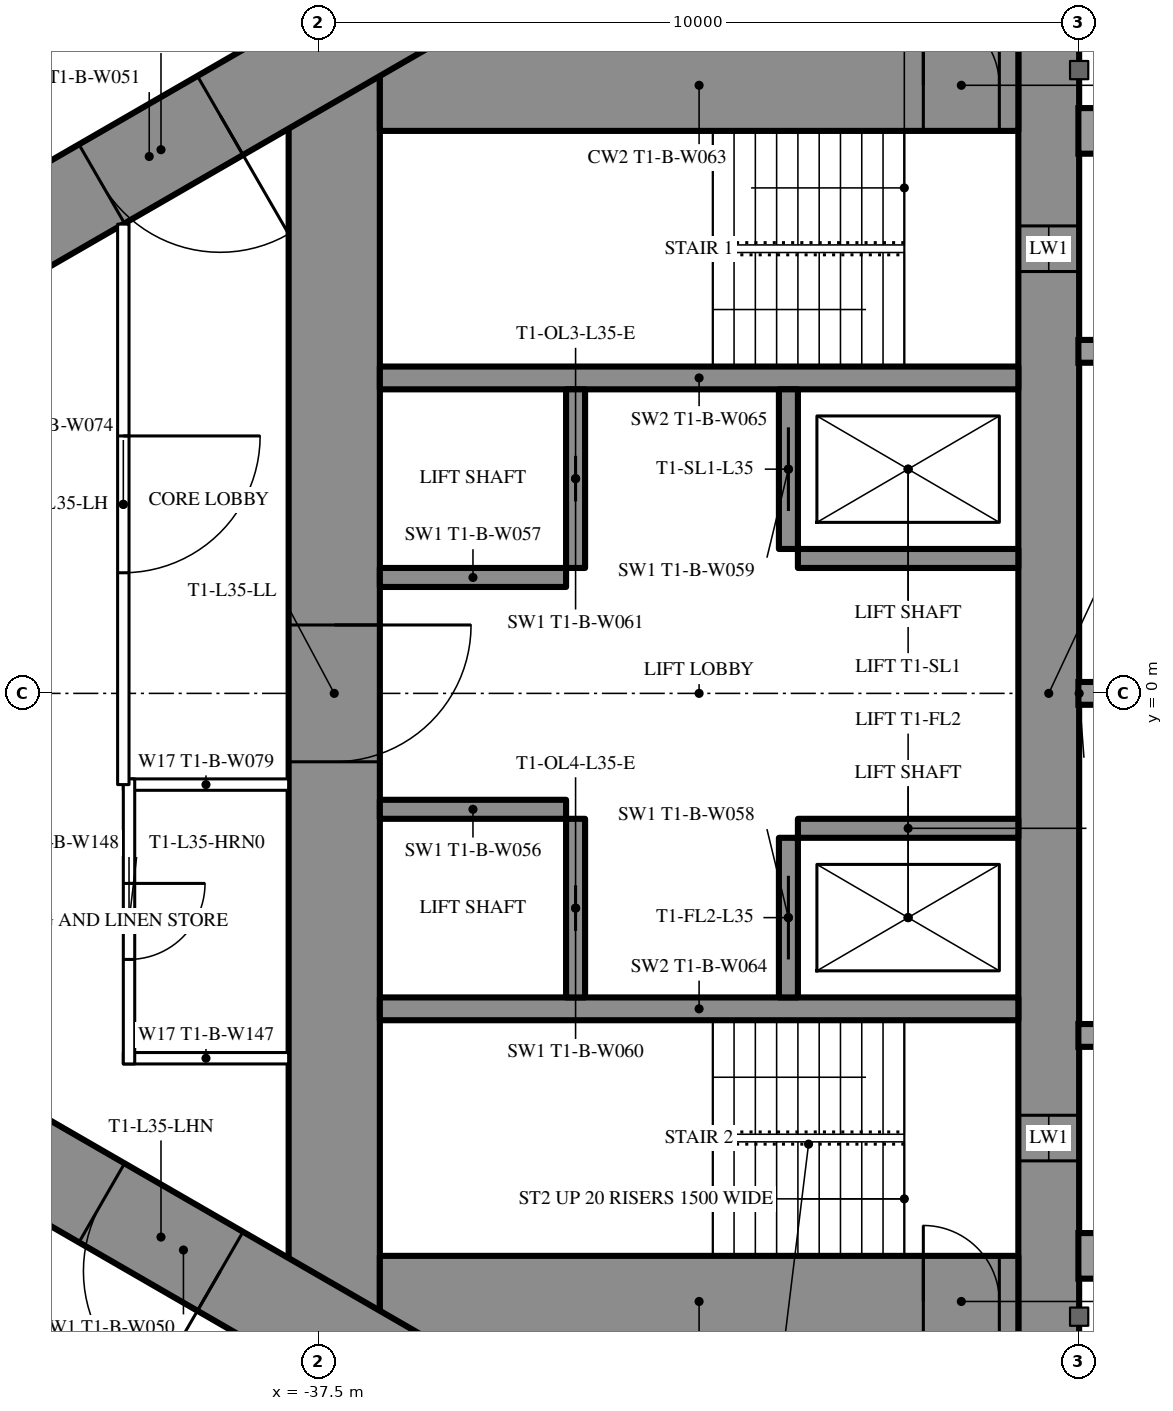
"""IFC4 building model, lengths in metres.
Left out: names, types, materials, properties, quantities, classifications, styles, units other than length and angle.
Written with IfcOpenShell. Run it as: python <this file> out.ifc"""

import sys

from ifc_helpers import new_model, si_unit, direction, frame, frame_2d, origin, place, context, subcontext, project, spatial, rectangle, extrude, element, fill, save


model = new_model("IFC4")
c1 = context("Model", 3, precision=1e-05, world=origin(), true_north=direction((0.0, 1.0)))
c2 = subcontext(c1, "Body", "Model", "MODEL_VIEW")
j1 = project(units=[si_unit("LENGTHUNIT", "METRE"), si_unit("PLANEANGLEUNIT", "RADIAN")], contexts=[c1])
p1 = place(None, origin())
s1 = spatial("IfcSite", under=j1, at=p1, CompositionType="ELEMENT")
p2 = place(p1, origin())
s2 = spatial("IfcBuilding", under=s1, at=p2, CompositionType="ELEMENT")
p3 = place(p2, frame((0.0, 0.0, 132.6)))
s3 = spatial("IfcBuildingStorey", under=s2, at=p3, CompositionType="ELEMENT", Elevation=132.6)
p4 = place(p3, frame((-27.9, 8.6, 0.0), z_axis=(0.0, 0.0, 1.0), x_axis=(0.0, -1.0, 0.0)))
e1 = element("IfcWall", 1, at=p4, inside=s3, PredefinedType="SHEAR", context=c2, shape_type="SweptSolid", body=[
    extrude(rectangle(XDim=17.2, YDim=0.8, at=frame_2d((8.6, 0.0))), origin(), (0.0, 0.0, 1.0), 3.5),
])
p5 = place(p4, frame((2.45, 0.0, 0.6)))
e2 = element("IfcOpeningElement", 2, at=p5, cuts=e1, PredefinedType="OPENING", context=c2, shape_type="SweptSolid", body=[
    extrude(rectangle(XDim=0.6, YDim=2.1, at=frame_2d((0.3, 1.05))), frame((0.0, 0.41, 0.0), z_axis=(0.0, -1.0, 0.0), x_axis=(1.0, 0.0, 0.0)), (0.0, 0.0, 1.0), 0.82),
])
p6 = place(p4, frame((14.15, 0.0, 0.6)))
e3 = element("IfcOpeningElement", 3, at=p6, cuts=e1, PredefinedType="OPENING", context=c2, shape_type="SweptSolid", body=[
    extrude(rectangle(XDim=0.6, YDim=2.1, at=frame_2d((0.3, 1.05))), frame((0.0, 0.41, 0.0), z_axis=(0.0, -1.0, 0.0), x_axis=(1.0, 0.0, 0.0)), (0.0, 0.0, 1.0), 0.82),
])
p7 = place(p3, frame((-37.3, 8.6, 0.0), z_axis=(0.0, 0.0, 1.0), x_axis=(0.0, -1.0, 0.0)))
e4 = element("IfcWall", 4, at=p7, inside=s3, PredefinedType="SHEAR", context=c2, shape_type="SweptSolid", body=[
    extrude(rectangle(XDim=17.2, YDim=1.2, at=frame_2d((8.6, 0.0))), origin(), (0.0, 0.0, 1.0), 3.5),
])
p8 = place(p7, frame((7.7, 0.0, 0.0)))
e5 = element("IfcOpeningElement", 5, at=p8, cuts=e4, PredefinedType="OPENING", context=c2, shape_type="SweptSolid", body=[
    extrude(rectangle(XDim=1.8, YDim=2.2, at=frame_2d((0.9, 1.1))), frame((0.0, 0.61, 0.0), z_axis=(0.0, -1.0, 0.0), x_axis=(1.0, 0.0, 0.0)), (0.0, 0.0, 1.0), 1.22),
])
p9 = place(p3, frame((-28.3, 8.0, 0.0), z_axis=(0.0, 0.0, 1.0), x_axis=(-1.0, 0.0, 0.0)))
e6 = element("IfcWall", 6, at=p9, inside=s3, PredefinedType="SHEAR", context=c2, shape_type="SweptSolid", body=[
    extrude(rectangle(XDim=8.4, YDim=1.2, at=frame_2d((4.2, 0.0))), origin(), (0.0, 0.0, 1.0), 3.5),
])
p10 = place(p9, frame((0.25, 0.0, 0.0)))
e7 = element("IfcOpeningElement", 7, at=p10, cuts=e6, PredefinedType="OPENING", context=c2, shape_type="SweptSolid", body=[
    extrude(rectangle(XDim=1.0, YDim=2.2, at=frame_2d((0.5, 1.1))), frame((0.0, 0.61, 0.0), z_axis=(0.0, -1.0, 0.0), x_axis=(1.0, 0.0, 0.0)), (0.0, 0.0, 1.0), 1.22),
])
p11 = place(p3, frame((-28.3, -8.0, 0.0), z_axis=(0.0, 0.0, 1.0), x_axis=(-1.0, 0.0, 0.0)))
e8 = element("IfcWall", 8, at=p11, inside=s3, PredefinedType="SHEAR", context=c2, shape_type="SweptSolid", body=[
    extrude(rectangle(XDim=8.4, YDim=1.2, at=frame_2d((4.2, 0.0))), origin(), (0.0, 0.0, 1.0), 3.5),
])
p12 = place(p11, frame((0.25, 0.0, 0.0)))
e9 = element("IfcOpeningElement", 9, at=p12, cuts=e8, PredefinedType="OPENING", context=c2, shape_type="SweptSolid", body=[
    extrude(rectangle(XDim=1.0, YDim=2.2, at=frame_2d((0.5, 1.1))), frame((0.0, 0.61, 0.0), z_axis=(0.0, -1.0, 0.0), x_axis=(1.0, 0.0, 0.0)), (0.0, 0.0, 1.0), 1.22),
])
for number, where, z_axis, x_axis in (
    (10, (-28.3, 4.15, 0.0), (0.0, 0.0, 1.0), (-1.0, 0.0, 0.0)),
    (11, (-28.3, -4.15, 0.0), (0.0, 0.0, 1.0), (-1.0, 0.0, 0.0)),
):
    element("IfcWall", number, at=place(p3, frame(where, z_axis=z_axis, x_axis=x_axis)), inside=s3, PredefinedType="SHEAR", context=c2, shape_type="SweptSolid", body=[
        extrude(rectangle(XDim=8.4, YDim=0.3, at=frame_2d((4.2, 0.0))), origin(), (0.0, 0.0, 1.0), 3.5),
    ])
p13 = place(p3, frame((-31.325, 4.0, 0.0), z_axis=(0.0, 0.0, 1.0), x_axis=(0.0, -1.0, 0.0)))
e12 = element("IfcWall", 12, at=p13, inside=s3, PredefinedType="SHEAR", context=c2, shape_type="SweptSolid", body=[
    extrude(rectangle(XDim=2.1, YDim=0.25, at=frame_2d((1.05, 0.0))), origin(), (0.0, 0.0, 1.0), 3.5),
])
p14 = place(p13, frame((0.5, 0.0, 0.0)))
e13 = element("IfcOpeningElement", 13, at=p14, cuts=e12, PredefinedType="OPENING", context=c2, shape_type="SweptSolid", body=[
    extrude(rectangle(XDim=1.1, YDim=2.2, at=frame_2d((0.55, 1.1))), frame((0.0, 0.135, 0.0), z_axis=(0.0, -1.0, 0.0), x_axis=(1.0, 0.0, 0.0)), (0.0, 0.0, 1.0), 0.27),
])
p15 = place(p3, frame((-34.125, 4.0, 0.0), z_axis=(0.0, 0.0, 1.0), x_axis=(0.0, -1.0, 0.0)))
e14 = element("IfcWall", 14, at=p15, inside=s3, PredefinedType="SHEAR", context=c2, shape_type="SweptSolid", body=[
    extrude(rectangle(XDim=2.35, YDim=0.25, at=frame_2d((1.175, 0.0))), origin(), (0.0, 0.0, 1.0), 3.5),
])
p16 = place(p15, frame((0.875, 0.0, 0.0)))
e15 = element("IfcOpeningElement", 15, at=p16, cuts=e14, PredefinedType="OPENING", context=c2, shape_type="SweptSolid", body=[
    extrude(rectangle(XDim=0.6, YDim=2.0, at=frame_2d((0.3, 1.0))), frame((0.0, 0.135, 0.0), z_axis=(0.0, -1.0, 0.0), x_axis=(1.0, 0.0, 0.0)), (0.0, 0.0, 1.0), 0.27),
])
p17 = place(p3, frame((-28.3, 1.775, 0.0), z_axis=(0.0, 0.0, 1.0), x_axis=(-1.0, 0.0, 0.0)))
e16 = element("IfcWall", 16, at=p17, inside=s3, PredefinedType="SHEAR", context=c2, shape_type="SweptSolid", body=[
    extrude(rectangle(XDim=2.9, YDim=0.25, at=frame_2d((1.45, 0.0))), origin(), (0.0, 0.0, 1.0), 3.5),
])
p18 = place(p3, frame((-34.25, 1.525, 0.0), z_axis=(0.0, 0.0, 1.0), x_axis=(-1.0, 0.0, 0.0)))
e17 = element("IfcWall", 17, at=p18, inside=s3, PredefinedType="SHEAR", context=c2, shape_type="SweptSolid", body=[
    extrude(rectangle(XDim=2.45, YDim=0.25, at=frame_2d((1.225, 0.0))), origin(), (0.0, 0.0, 1.0), 3.5),
])
p19 = place(p3, frame((-31.325, -1.9, 0.0), z_axis=(0.0, 0.0, 1.0), x_axis=(0.0, -1.0, 0.0)))
e18 = element("IfcWall", 18, at=p19, inside=s3, PredefinedType="SHEAR", context=c2, shape_type="SweptSolid", body=[
    extrude(rectangle(XDim=2.1, YDim=0.25, at=frame_2d((1.05, 0.0))), origin(), (0.0, 0.0, 1.0), 3.5),
])
p20 = place(p19, frame((0.5, 0.0, 0.0)))
e19 = element("IfcOpeningElement", 19, at=p20, cuts=e18, PredefinedType="OPENING", context=c2, shape_type="SweptSolid", body=[
    extrude(rectangle(XDim=1.1, YDim=2.2, at=frame_2d((0.55, 1.1))), frame((0.0, 0.135, 0.0), z_axis=(0.0, -1.0, 0.0), x_axis=(1.0, 0.0, 0.0)), (0.0, 0.0, 1.0), 0.27),
])
p21 = place(p3, frame((-34.125, -1.65, 0.0), z_axis=(0.0, 0.0, 1.0), x_axis=(0.0, -1.0, 0.0)))
e20 = element("IfcWall", 20, at=p21, inside=s3, PredefinedType="SHEAR", context=c2, shape_type="SweptSolid", body=[
    extrude(rectangle(XDim=2.35, YDim=0.25, at=frame_2d((1.175, 0.0))), origin(), (0.0, 0.0, 1.0), 3.5),
])
p22 = place(p21, frame((0.875, 0.0, 0.0)))
e21 = element("IfcOpeningElement", 21, at=p22, cuts=e20, PredefinedType="OPENING", context=c2, shape_type="SweptSolid", body=[
    extrude(rectangle(XDim=0.6, YDim=2.0, at=frame_2d((0.3, 1.0))), frame((0.0, 0.135, 0.0), z_axis=(0.0, -1.0, 0.0), x_axis=(1.0, 0.0, 0.0)), (0.0, 0.0, 1.0), 0.27),
])
p23 = place(p3, frame((-28.3, -1.775, 0.0), z_axis=(0.0, 0.0, 1.0), x_axis=(-1.0, 0.0, 0.0)))
e22 = element("IfcWall", 22, at=p23, inside=s3, PredefinedType="SHEAR", context=c2, shape_type="SweptSolid", body=[
    extrude(rectangle(XDim=2.9, YDim=0.25, at=frame_2d((1.45, 0.0))), origin(), (0.0, 0.0, 1.0), 3.5),
])
p24 = place(p3, frame((-34.25, -1.525, 0.0), z_axis=(0.0, 0.0, 1.0), x_axis=(-1.0, 0.0, 0.0)))
e23 = element("IfcWall", 23, at=p24, inside=s3, PredefinedType="SHEAR", context=c2, shape_type="SweptSolid", body=[
    extrude(rectangle(XDim=2.45, YDim=0.25, at=frame_2d((1.225, 0.0))), origin(), (0.0, 0.0, 1.0), 3.5),
])
p25 = place(p3, frame((-27.2, 14.3, 0.0), z_axis=(0.0, 0.0, 1.0), x_axis=(-0.866026593062, -0.499997940104, 0.0)))
e24 = element("IfcWall", 24, at=p25, inside=s3, PredefinedType="SHEAR", context=c2, shape_type="SweptSolid", body=[
    extrude(rectangle(XDim=28.946, YDim=1.2, at=frame_2d((14.473, 0.0))), origin(), (0.0, 0.0, 1.0), 3.5),
])
p26 = place(p25, frame((4.6, 0.0, 0.0)))
e25 = element("IfcOpeningElement", 25, at=p26, cuts=e24, PredefinedType="OPENING", context=c2, shape_type="SweptSolid", body=[
    extrude(rectangle(XDim=1.0, YDim=2.2, at=frame_2d((0.5, 1.1))), frame((0.0, 0.61, 0.0), z_axis=(0.0, -1.0, 0.0), x_axis=(1.0, 0.0, 0.0)), (0.0, 0.0, 1.0), 1.22),
])
p27 = place(p25, frame((13.395, 0.0, 0.0)))
e26 = element("IfcOpeningElement", 26, at=p27, cuts=e24, PredefinedType="OPENING", context=c2, shape_type="SweptSolid", body=[
    extrude(rectangle(XDim=1.8, YDim=2.2, at=frame_2d((0.9, 1.1))), frame((0.0, 0.61, 0.0), z_axis=(0.0, -1.0, 0.0), x_axis=(1.0, 0.0, 0.0)), (0.0, 0.0, 1.0), 1.22),
])
p28 = place(p3, frame((-27.2, -14.3, 0.0), z_axis=(0.0, 0.0, 1.0), x_axis=(-0.866024021859, 0.500002393557, 0.0)))
e27 = element("IfcWall", 27, at=p28, inside=s3, PredefinedType="SHEAR", context=c2, shape_type="SweptSolid", body=[
    extrude(rectangle(XDim=27.907, YDim=1.2, at=frame_2d((13.954, 0.0))), origin(), (0.0, 0.0, 1.0), 3.5),
])
p29 = place(p28, frame((4.6, 0.0, 0.0)))
e28 = element("IfcOpeningElement", 28, at=p29, cuts=e27, PredefinedType="OPENING", context=c2, shape_type="SweptSolid", body=[
    extrude(rectangle(XDim=1.0, YDim=2.2, at=frame_2d((0.5, 1.1))), frame((0.0, 0.61, 0.0), z_axis=(0.0, -1.0, 0.0), x_axis=(1.0, 0.0, 0.0)), (0.0, 0.0, 1.0), 1.22),
])
p30 = place(p28, frame((13.395, 0.0, 0.0)))
e29 = element("IfcOpeningElement", 29, at=p30, cuts=e27, PredefinedType="OPENING", context=c2, shape_type="SweptSolid", body=[
    extrude(rectangle(XDim=1.8, YDim=2.2, at=frame_2d((0.9, 1.1))), frame((0.0, 0.61, 0.0), z_axis=(0.0, -1.0, 0.0), x_axis=(1.0, 0.0, 0.0)), (0.0, 0.0, 1.0), 1.22),
])
p31 = place(p3, frame((-37.7, 10.894, 0.0), z_axis=(0.0, 0.0, 1.0), x_axis=(-0.866027905338, -0.499995667157, 0.0)))
e30 = element("IfcWall", 30, at=p31, inside=s3, PredefinedType="PARTITIONING", context=c2, shape_type="SweptSolid", body=[
    extrude(rectangle(XDim=21.787, YDim=0.2, at=frame_2d((10.894, 0.0))), origin(), (0.0, 0.0, 1.0), 3.25),
])
p32 = place(p31, frame((17.711, 0.0, 0.0)))
e31 = element("IfcOpeningElement", 31, at=p32, cuts=e30, PredefinedType="OPENING", context=c2, shape_type="SweptSolid", body=[
    extrude(rectangle(XDim=0.95, YDim=2.2, at=frame_2d((0.475, 1.1))), frame((0.0, 0.11, 0.0), z_axis=(0.0, -1.0, 0.0), x_axis=(1.0, 0.0, 0.0)), (0.0, 0.0, 1.0), 0.22),
])
p33 = place(p31, frame((19.399, 0.0, 0.0)))
e32 = element("IfcOpeningElement", 32, at=p33, cuts=e30, PredefinedType="OPENING", context=c2, shape_type="SweptSolid", body=[
    extrude(rectangle(XDim=1.8, YDim=2.2, at=frame_2d((0.9, 1.1))), frame((0.0, 0.11, 0.0), z_axis=(0.0, -1.0, 0.0), x_axis=(1.0, 0.0, 0.0)), (0.0, 0.0, 1.0), 0.22),
])
p34 = place(p31, frame((0.6, 0.0, 0.0)))
e33 = element("IfcOpeningElement", 33, at=p34, cuts=e30, PredefinedType="OPENING", context=c2, shape_type="SweptSolid", body=[
    extrude(rectangle(XDim=0.95, YDim=2.2, at=frame_2d((0.475, 1.1))), frame((0.0, 0.11, 0.0), z_axis=(0.0, -1.0, 0.0), x_axis=(1.0, 0.0, 0.0)), (0.0, 0.0, 1.0), 0.22),
])
p35 = place(p3, frame((-36.92, -11.344, 0.0), z_axis=(0.0, 0.0, 1.0), x_axis=(-0.866027897759, 0.499995680284, 0.0)))
e34 = element("IfcWall", 34, at=p35, inside=s3, PredefinedType="PARTITIONING", context=c2, shape_type="SweptSolid", body=[
    extrude(rectangle(XDim=11.731, YDim=0.2, at=frame_2d((5.865, 0.0))), origin(), (0.0, 0.0, 1.0), 3.25),
])
p36 = place(p35, frame((3.35, 0.0, 0.0)))
e35 = element("IfcOpeningElement", 35, at=p36, cuts=e34, PredefinedType="OPENING", context=c2, shape_type="SweptSolid", body=[
    extrude(rectangle(XDim=1.0, YDim=2.2, at=frame_2d((0.5, 1.1))), frame((0.0, 0.11, 0.0), z_axis=(0.0, -1.0, 0.0), x_axis=(1.0, 0.0, 0.0)), (0.0, 0.0, 1.0), 0.22),
])
for number, where, z_axis, x_axis in (
    (36, (-37.9, -1.2, 0.0), (0.0, 0.0, 1.0), (-1.0, 0.0, 0.0)),
    (37, (-37.9, -4.8, 0.0), (0.0, 0.0, 1.0), (-1.0, 0.0, 0.0)),
):
    element("IfcWall", number, at=place(p3, frame(where, z_axis=z_axis, x_axis=x_axis)), inside=s3, PredefinedType="PARTITIONING", context=c2, shape_type="SweptSolid", body=[
        extrude(rectangle(XDim=2.175, YDim=0.15, at=frame_2d((1.087, 0.0))), origin(), (0.0, 0.0, 1.0), 3.25),
    ])
p37 = place(p3, frame((-40.0, -1.125, 0.0), z_axis=(0.0, 0.0, 1.0), x_axis=(0.0, -1.0, 0.0)))
e38 = element("IfcWall", 38, at=p37, inside=s3, PredefinedType="PARTITIONING", context=c2, shape_type="SweptSolid", body=[
    extrude(rectangle(XDim=3.75, YDim=0.15, at=frame_2d((1.875, 0.0))), origin(), (0.0, 0.0, 1.0), 3.25),
])
p38 = place(p37, frame((1.375, 0.0, 0.0)))
e39 = element("IfcOpeningElement", 39, at=p38, cuts=e38, PredefinedType="OPENING", context=c2, shape_type="SweptSolid", body=[
    extrude(rectangle(XDim=1.0, YDim=2.2, at=frame_2d((0.5, 1.1))), frame((0.0, 0.085, 0.0), z_axis=(0.0, -1.0, 0.0), x_axis=(1.0, 0.0, 0.0)), (0.0, 0.0, 1.0), 0.17),
])
p39 = place(p3, frame((-40.075, 6.174, 0.0), z_axis=(0.0, 0.0, 1.0), x_axis=(0.0, -1.0, 0.0)))
e40 = element("IfcWall", 40, at=p39, inside=s3, PredefinedType="PARTITIONING", context=c2, shape_type="SweptSolid", body=[
    extrude(rectangle(XDim=7.374, YDim=0.15, at=frame_2d((3.687, 0.0))), origin(), (0.0, 0.0, 1.0), 3.25),
])
p40 = place(p39, frame((2.787, 0.0, 0.0)))
e41 = element("IfcOpeningElement", 41, at=p40, cuts=e40, PredefinedType="OPENING", context=c2, shape_type="SweptSolid", body=[
    extrude(rectangle(XDim=1.8, YDim=2.2, at=frame_2d((0.9, 1.1))), frame((0.0, 0.085, 0.0), z_axis=(0.0, -1.0, 0.0), x_axis=(1.0, 0.0, 0.0)), (0.0, 0.0, 1.0), 0.17),
])
p41 = place(p38, origin())
e42 = element("IfcDoor", 42, at=p41, inside=s3, OperationType="SINGLE_SWING_LEFT", PredefinedType="DOOR", context=c2, shape_type="SweptSolid", body=[
    extrude(rectangle(XDim=1.0, YDim=2.2, at=frame_2d((0.5, 1.1))), frame((0.0, 0.025, 0.0), z_axis=(0.0, -1.0, 0.0), x_axis=(1.0, 0.0, 0.0)), (0.0, 0.0, 1.0), 0.05),
])
fill(e39, e42)
p42 = place(p40, origin())
e43 = element("IfcDoor", 43, at=p42, inside=s3, OperationType="DOUBLE_DOOR_SINGLE_SWING", PredefinedType="DOOR", context=c2, shape_type="SweptSolid", body=[
    extrude(rectangle(XDim=1.8, YDim=2.2, at=frame_2d((0.9, 1.1))), frame((0.0, 0.025, 0.0), z_axis=(0.0, -1.0, 0.0), x_axis=(1.0, 0.0, 0.0)), (0.0, 0.0, 1.0), 0.05),
])
fill(e41, e43)
p43 = place(p27, origin())
e44 = element("IfcDoor", 44, at=p43, inside=s3, OperationType="DOUBLE_DOOR_SINGLE_SWING", PredefinedType="DOOR", context=c2, shape_type="SweptSolid", body=[
    extrude(rectangle(XDim=1.8, YDim=2.2, at=frame_2d((0.9, 1.1))), frame((0.0, 0.025, 0.0), z_axis=(0.0, -1.0, 0.0), x_axis=(1.0, 0.0, 0.0)), (0.0, 0.0, 1.0), 0.05),
])
fill(e26, e44)
p44 = place(p30, origin())
e45 = element("IfcDoor", 45, at=p44, inside=s3, OperationType="DOUBLE_DOOR_SINGLE_SWING", PredefinedType="DOOR", context=c2, shape_type="SweptSolid", body=[
    extrude(rectangle(XDim=1.8, YDim=2.2, at=frame_2d((0.9, 1.1))), frame((0.0, 0.025, 0.0), z_axis=(0.0, -1.0, 0.0), x_axis=(1.0, 0.0, 0.0)), (0.0, 0.0, 1.0), 0.05),
])
fill(e29, e45)
p45 = place(p8, origin())
e46 = element("IfcDoor", 46, at=p45, inside=s3, OperationType="DOUBLE_DOOR_SINGLE_SWING", PredefinedType="DOOR", context=c2, shape_type="SweptSolid", body=[
    extrude(rectangle(XDim=1.8, YDim=2.2, at=frame_2d((0.9, 1.1))), frame((0.0, 0.025, 0.0), z_axis=(0.0, -1.0, 0.0), x_axis=(1.0, 0.0, 0.0)), (0.0, 0.0, 1.0), 0.05),
])
fill(e5, e46)
p46 = place(p10, origin())
e47 = element("IfcDoor", 47, at=p46, inside=s3, OperationType="SINGLE_SWING_RIGHT", PredefinedType="DOOR", context=c2, shape_type="SweptSolid", body=[
    extrude(rectangle(XDim=1.0, YDim=2.2, at=frame_2d((0.5, 1.1))), frame((0.0, 0.025, 0.0), z_axis=(0.0, -1.0, 0.0), x_axis=(1.0, 0.0, 0.0)), (0.0, 0.0, 1.0), 0.05),
])
fill(e7, e47)
p47 = place(p12, origin())
e48 = element("IfcDoor", 48, at=p47, inside=s3, OperationType="SINGLE_SWING_RIGHT", PredefinedType="DOOR", context=c2, shape_type="SweptSolid", body=[
    extrude(rectangle(XDim=1.0, YDim=2.2, at=frame_2d((0.5, 1.1))), frame((0.0, 0.025, 0.0), z_axis=(0.0, -1.0, 0.0), x_axis=(1.0, 0.0, 0.0)), (0.0, 0.0, 1.0), 0.05),
])
fill(e9, e48)
p48 = place(p14, origin())
e49 = element("IfcDoor", 49, at=p48, inside=s3, OperationType="SLIDING_TO_LEFT", PredefinedType="USERDEFINED", context=c2, shape_type="SweptSolid", body=[
    extrude(rectangle(XDim=1.1, YDim=2.2, at=frame_2d((0.55, 1.1))), frame((0.0, 0.025, 0.0), z_axis=(0.0, -1.0, 0.0), x_axis=(1.0, 0.0, 0.0)), (0.0, 0.0, 1.0), 0.05),
])
fill(e13, e49)
p49 = place(p20, origin())
e50 = element("IfcDoor", 50, at=p49, inside=s3, OperationType="SLIDING_TO_LEFT", PredefinedType="USERDEFINED", context=c2, shape_type="SweptSolid", body=[
    extrude(rectangle(XDim=1.1, YDim=2.2, at=frame_2d((0.55, 1.1))), frame((0.0, 0.025, 0.0), z_axis=(0.0, -1.0, 0.0), x_axis=(1.0, 0.0, 0.0)), (0.0, 0.0, 1.0), 0.05),
])
fill(e19, e50)
p50 = place(p16, origin())
e51 = element("IfcDoor", 51, at=p50, inside=s3, OperationType="SLIDING_TO_LEFT", PredefinedType="DOOR", context=c2, shape_type="SweptSolid", body=[
    extrude(rectangle(XDim=0.6, YDim=2.0, at=frame_2d((0.3, 1.0))), frame((0.0, 0.025, 0.0), z_axis=(0.0, -1.0, 0.0), x_axis=(1.0, 0.0, 0.0)), (0.0, 0.0, 1.0), 0.05),
])
fill(e15, e51)
p51 = place(p22, origin())
e52 = element("IfcDoor", 52, at=p51, inside=s3, OperationType="SLIDING_TO_LEFT", PredefinedType="DOOR", context=c2, shape_type="SweptSolid", body=[
    extrude(rectangle(XDim=0.6, YDim=2.0, at=frame_2d((0.3, 1.0))), frame((0.0, 0.025, 0.0), z_axis=(0.0, -1.0, 0.0), x_axis=(1.0, 0.0, 0.0)), (0.0, 0.0, 1.0), 0.05),
])
fill(e21, e52)
p52 = place(p5, origin())
e53 = element("IfcWindow", 53, at=p52, inside=s3, PartitioningType="SINGLE_PANEL", PredefinedType="WINDOW", context=c2, shape_type="SweptSolid", body=[
    extrude(rectangle(XDim=0.6, YDim=2.1, at=frame_2d((0.3, 1.05))), frame((0.0, 0.03, 0.0), z_axis=(0.0, -1.0, 0.0), x_axis=(1.0, 0.0, 0.0)), (0.0, 0.0, 1.0), 0.06),
])
fill(e2, e53)
p53 = place(p6, origin())
e54 = element("IfcWindow", 54, at=p53, inside=s3, PartitioningType="SINGLE_PANEL", PredefinedType="WINDOW", context=c2, shape_type="SweptSolid", body=[
    extrude(rectangle(XDim=0.6, YDim=2.1, at=frame_2d((0.3, 1.05))), frame((0.0, 0.03, 0.0), z_axis=(0.0, -1.0, 0.0), x_axis=(1.0, 0.0, 0.0)), (0.0, 0.0, 1.0), 0.06),
])
fill(e3, e54)
save(model, sys.argv[1])
